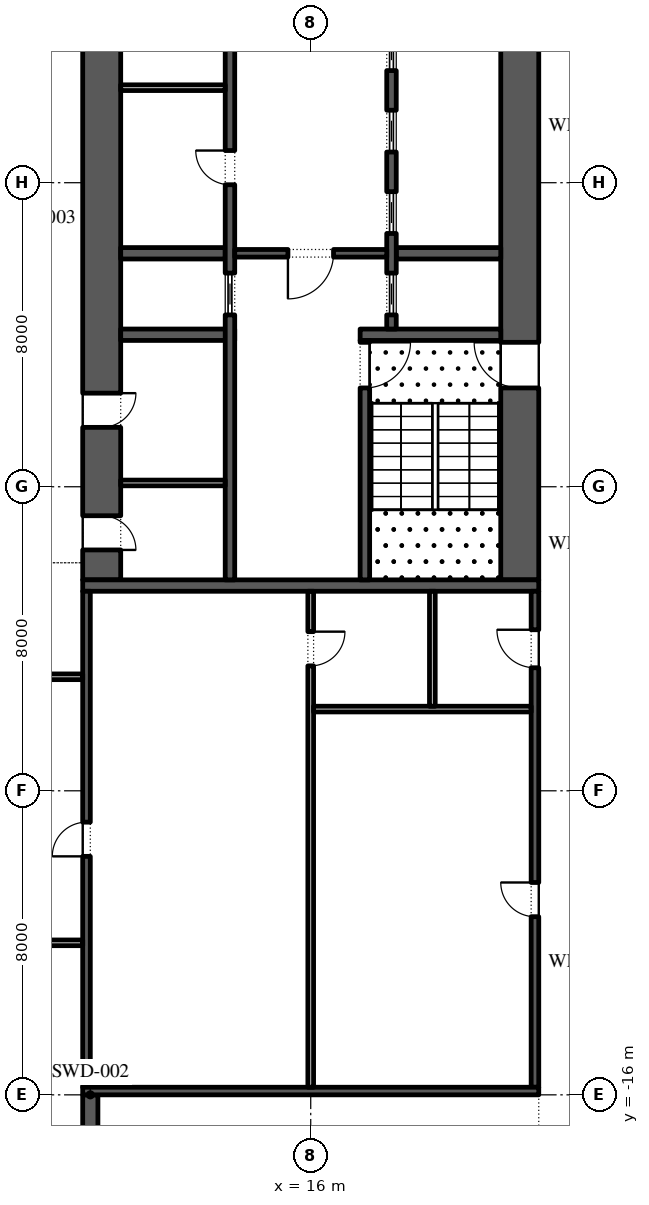
"""IFC4 building model, lengths in metres.
Left out: names, types, materials, properties, quantities, classifications, styles, units other than length and angle.
Written with IfcOpenShell. Run it as: python <this file> out.ifc"""

import sys

from ifc_helpers import new_model, si_unit, direction, frame, frame_2d, origin, place, context, subcontext, project, spatial, rectangle, extrude, element, fill, save


model = new_model("IFC4")
c1 = context("Model", 3, precision=1e-05, world=origin(), true_north=direction((0.0, 1.0)))
c2 = subcontext(c1, "Body", "Model", "MODEL_VIEW")
j1 = project(units=[si_unit("LENGTHUNIT", "METRE"), si_unit("PLANEANGLEUNIT", "RADIAN")], contexts=[c1])
p1 = place(None, origin())
s1 = spatial("IfcSite", under=j1, at=p1, CompositionType="ELEMENT")
p2 = place(p1, origin())
s2 = spatial("IfcBuilding", under=s1, at=p2, CompositionType="ELEMENT")
p3 = place(p2, frame((0.0, 0.0, 8.0)))
s3 = spatial("IfcBuildingStorey", under=s2, at=p3, CompositionType="ELEMENT", Elevation=8.0)
p4 = place(p3, frame((10.2, -31.0, 0.0), z_axis=(0.0, 0.0, 1.0), x_axis=(0.0, 1.0, 0.0)))
e1 = element("IfcWall", 1, at=p4, inside=s3, PredefinedType="SHEAR", context=c2, shape_type="SweptSolid", body=[
    extrude(rectangle(XDim=15.0, YDim=0.4, at=frame_2d((7.5, 0.0))), origin(), (0.0, 0.0, 1.0), 5.7),
])
p5 = place(p3, frame((21.5, -2.45, 0.0), z_axis=(0.0, 0.0, 1.0), x_axis=(0.0, 1.0, 0.0)))
e2 = element("IfcWall", 2, at=p5, inside=s3, PredefinedType="SHEAR", context=c2, shape_type="SweptSolid", body=[
    extrude(rectangle(XDim=27.9, YDim=1.0, at=frame_2d((13.95, 0.0))), origin(), (0.0, 0.0, 1.0), 5.7),
])
p6 = place(p5, frame((5.05, 0.0, 0.0)))
e3 = element("IfcOpeningElement", 3, at=p6, cuts=e2, PredefinedType="OPENING", context=c2, shape_type="SweptSolid", body=[
    extrude(rectangle(XDim=1.2, YDim=2.1, at=frame_2d((0.6, 1.05))), frame((0.0, 0.51, 0.0), z_axis=(0.0, -1.0, 0.0), x_axis=(1.0, 0.0, 0.0)), (0.0, 0.0, 1.0), 1.02),
])
p7 = place(p5, frame((21.65, 0.0, 0.0)))
e4 = element("IfcOpeningElement", 4, at=p7, cuts=e2, PredefinedType="OPENING", context=c2, shape_type="SweptSolid", body=[
    extrude(rectangle(XDim=1.2, YDim=2.1, at=frame_2d((0.6, 1.05))), frame((0.0, 0.51, 0.0), z_axis=(0.0, -1.0, 0.0), x_axis=(1.0, 0.0, 0.0)), (0.0, 0.0, 1.0), 1.02),
])
p8 = place(p3, frame((10.5, -2.45, 0.0), z_axis=(0.0, 0.0, 1.0), x_axis=(0.0, 1.0, 0.0)))
e5 = element("IfcWall", 5, at=p8, inside=s3, PredefinedType="SHEAR", context=c2, shape_type="SweptSolid", body=[
    extrude(rectangle(XDim=27.9, YDim=1.0, at=frame_2d((13.95, 0.0))), origin(), (0.0, 0.0, 1.0), 5.7),
])
p9 = place(p8, frame((23.65, 0.0, 0.0)))
e6 = element("IfcOpeningElement", 6, at=p9, cuts=e5, PredefinedType="OPENING", context=c2, shape_type="SweptSolid", body=[
    extrude(rectangle(XDim=2.4, YDim=2.1, at=frame_2d((1.2, 1.05))), frame((0.0, 0.51, 0.0), z_axis=(0.0, -1.0, 0.0), x_axis=(1.0, 0.0, 0.0)), (0.0, 0.0, 1.0), 1.02),
])
p10 = place(p8, frame((0.788, 0.0, 0.0)))
e7 = element("IfcOpeningElement", 7, at=p10, cuts=e5, PredefinedType="OPENING", context=c2, shape_type="SweptSolid", body=[
    extrude(rectangle(XDim=0.9, YDim=2.1, at=frame_2d((0.45, 1.05))), frame((0.0, 0.51, 0.0), z_axis=(0.0, -1.0, 0.0), x_axis=(1.0, 0.0, 0.0)), (0.0, 0.0, 1.0), 1.02),
])
p11 = place(p8, frame((4.012, 0.0, 0.0)))
e8 = element("IfcOpeningElement", 8, at=p11, cuts=e5, PredefinedType="OPENING", context=c2, shape_type="SweptSolid", body=[
    extrude(rectangle(XDim=0.9, YDim=2.1, at=frame_2d((0.45, 1.05))), frame((0.0, 0.51, 0.0), z_axis=(0.0, -1.0, 0.0), x_axis=(1.0, 0.0, 0.0)), (0.0, 0.0, 1.0), 1.02),
])
p12 = place(p3, frame((10.0, -2.6, 0.0), z_axis=(0.0, 0.0, 1.0), x_axis=(1.0, 0.0, 0.0)))
e9 = element("IfcWall", 9, at=p12, inside=s3, PredefinedType="SHEAR", context=c2, shape_type="SweptSolid", body=[
    extrude(rectangle(XDim=12.0, YDim=0.3, at=frame_2d((6.0, 0.0))), origin(), (0.0, 0.0, 1.0), 5.7),
])
p13 = place(p3, frame((17.3, 4.0, 0.0), z_axis=(0.0, 0.0, 1.0), x_axis=(1.0, 0.0, 0.0)))
e10 = element("IfcWall", 10, at=p13, inside=s3, PredefinedType="SHEAR", context=c2, shape_type="SweptSolid", body=[
    extrude(rectangle(XDim=3.7, YDim=0.3, at=frame_2d((1.85, 0.0))), origin(), (0.0, 0.0, 1.0), 5.7),
])
p14 = place(p3, frame((17.425, -2.45, 0.0), z_axis=(0.0, 0.0, 1.0), x_axis=(0.0, 1.0, 0.0)))
e11 = element("IfcWall", 11, at=p14, inside=s3, PredefinedType="SHEAR", context=c2, shape_type="SweptSolid", body=[
    extrude(rectangle(XDim=6.3, YDim=0.25, at=frame_2d((3.15, 0.0))), origin(), (0.0, 0.0, 1.0), 5.7),
])
p15 = place(p14, frame((5.05, 0.0, 0.0)))
e12 = element("IfcOpeningElement", 12, at=p15, cuts=e11, PredefinedType="OPENING", context=c2, shape_type="SweptSolid", body=[
    extrude(rectangle(XDim=1.2, YDim=2.1, at=frame_2d((0.6, 1.05))), frame((0.0, 0.135, 0.0), z_axis=(0.0, -1.0, 0.0), x_axis=(1.0, 0.0, 0.0)), (0.0, 0.0, 1.0), 0.27),
])
p16 = place(p3, frame((18.25, 6.143, 0.0), z_axis=(0.0, 0.0, 1.0), x_axis=(1.0, 0.0, 0.0)))
e13 = element("IfcWall", 13, at=p16, inside=s3, PredefinedType="SHEAR", context=c2, shape_type="SweptSolid", body=[
    extrude(rectangle(XDim=2.75, YDim=0.3, at=frame_2d((1.375, 0.0))), origin(), (0.0, 0.0, 1.0), 5.7),
])
p17 = place(p3, frame((18.125, 4.15, 0.0), z_axis=(0.0, 0.0, 1.0), x_axis=(0.0, 1.0, 0.0)))
e14 = element("IfcWall", 14, at=p17, inside=s3, PredefinedType="SHEAR", context=c2, shape_type="SweptSolid", body=[
    extrude(rectangle(XDim=14.7, YDim=0.25, at=frame_2d((7.35, 0.0))), origin(), (0.0, 0.0, 1.0), 5.7),
])
p18 = place(p17, frame((0.371, 0.0, 0.0)))
e15 = element("IfcOpeningElement", 15, at=p18, cuts=e14, PredefinedType="OPENING", context=c2, shape_type="SweptSolid", body=[
    extrude(rectangle(XDim=1.1, YDim=2.1, at=frame_2d((0.55, 1.05))), frame((0.0, 0.135, 0.0), z_axis=(0.0, -1.0, 0.0), x_axis=(1.0, 0.0, 0.0)), (0.0, 0.0, 1.0), 0.27),
])
p19 = place(p17, frame((2.514, 0.0, 0.0)))
e16 = element("IfcOpeningElement", 16, at=p19, cuts=e14, PredefinedType="OPENING", context=c2, shape_type="SweptSolid", body=[
    extrude(rectangle(XDim=1.1, YDim=2.1, at=frame_2d((0.55, 1.05))), frame((0.0, 0.135, 0.0), z_axis=(0.0, -1.0, 0.0), x_axis=(1.0, 0.0, 0.0)), (0.0, 0.0, 1.0), 0.27),
])
p20 = place(p17, frame((4.657, 0.0, 0.0)))
e17 = element("IfcOpeningElement", 17, at=p20, cuts=e14, PredefinedType="OPENING", context=c2, shape_type="SweptSolid", body=[
    extrude(rectangle(XDim=1.1, YDim=2.1, at=frame_2d((0.55, 1.05))), frame((0.0, 0.135, 0.0), z_axis=(0.0, -1.0, 0.0), x_axis=(1.0, 0.0, 0.0)), (0.0, 0.0, 1.0), 0.27),
])
p21 = place(p17, frame((6.8, 0.0, 0.0)))
e18 = element("IfcOpeningElement", 18, at=p21, cuts=e14, PredefinedType="OPENING", context=c2, shape_type="SweptSolid", body=[
    extrude(rectangle(XDim=1.1, YDim=2.1, at=frame_2d((0.55, 1.05))), frame((0.0, 0.135, 0.0), z_axis=(0.0, -1.0, 0.0), x_axis=(1.0, 0.0, 0.0)), (0.0, 0.0, 1.0), 0.27),
])
p22 = place(p17, frame((8.943, 0.0, 0.0)))
e19 = element("IfcOpeningElement", 19, at=p22, cuts=e14, PredefinedType="OPENING", context=c2, shape_type="SweptSolid", body=[
    extrude(rectangle(XDim=1.1, YDim=2.1, at=frame_2d((0.55, 1.05))), frame((0.0, 0.135, 0.0), z_axis=(0.0, -1.0, 0.0), x_axis=(1.0, 0.0, 0.0)), (0.0, 0.0, 1.0), 0.27),
])
p23 = place(p17, frame((11.086, 0.0, 0.0)))
e20 = element("IfcOpeningElement", 20, at=p23, cuts=e14, PredefinedType="OPENING", context=c2, shape_type="SweptSolid", body=[
    extrude(rectangle(XDim=1.1, YDim=2.1, at=frame_2d((0.55, 1.05))), frame((0.0, 0.135, 0.0), z_axis=(0.0, -1.0, 0.0), x_axis=(1.0, 0.0, 0.0)), (0.0, 0.0, 1.0), 0.27),
])
p24 = place(p17, frame((13.229, 0.0, 0.0)))
e21 = element("IfcOpeningElement", 21, at=p24, cuts=e14, PredefinedType="OPENING", context=c2, shape_type="SweptSolid", body=[
    extrude(rectangle(XDim=1.1, YDim=2.1, at=frame_2d((0.55, 1.05))), frame((0.0, 0.135, 0.0), z_axis=(0.0, -1.0, 0.0), x_axis=(1.0, 0.0, 0.0)), (0.0, 0.0, 1.0), 0.27),
])
p25 = place(p3, frame((11.0, 4.0, 0.0), z_axis=(0.0, 0.0, 1.0), x_axis=(1.0, 0.0, 0.0)))
e22 = element("IfcWall", 22, at=p25, inside=s3, PredefinedType="SHEAR", context=c2, shape_type="SweptSolid", body=[
    extrude(rectangle(XDim=3.0, YDim=0.3, at=frame_2d((1.5, 0.0))), origin(), (0.0, 0.0, 1.0), 5.7),
])
p26 = place(p3, frame((11.0, 6.143, 0.0), z_axis=(0.0, 0.0, 1.0), x_axis=(1.0, 0.0, 0.0)))
e23 = element("IfcWall", 23, at=p26, inside=s3, PredefinedType="SHEAR", context=c2, shape_type="SweptSolid", body=[
    extrude(rectangle(XDim=2.75, YDim=0.3, at=frame_2d((1.375, 0.0))), origin(), (0.0, 0.0, 1.0), 5.7),
])
p27 = place(p3, frame((13.875, -2.45, 0.0), z_axis=(0.0, 0.0, 1.0), x_axis=(0.0, 1.0, 0.0)))
e24 = element("IfcWall", 24, at=p27, inside=s3, PredefinedType="SHEAR", context=c2, shape_type="SweptSolid", body=[
    extrude(rectangle(XDim=21.3, YDim=0.25, at=frame_2d((10.65, 0.0))), origin(), (0.0, 0.0, 1.0), 5.7),
])
p28 = place(p27, frame((10.396, 0.0, 0.0)))
e25 = element("IfcOpeningElement", 25, at=p28, cuts=e24, PredefinedType="OPENING", context=c2, shape_type="SweptSolid", body=[
    extrude(rectangle(XDim=0.9, YDim=2.1, at=frame_2d((0.45, 1.05))), frame((0.0, 0.135, 0.0), z_axis=(0.0, -1.0, 0.0), x_axis=(1.0, 0.0, 0.0)), (0.0, 0.0, 1.0), 0.27),
])
p29 = place(p27, frame((14.6, 0.0, 0.0)))
e26 = element("IfcOpeningElement", 26, at=p29, cuts=e24, PredefinedType="OPENING", context=c2, shape_type="SweptSolid", body=[
    extrude(rectangle(XDim=0.9, YDim=2.1, at=frame_2d((0.45, 1.05))), frame((0.0, 0.135, 0.0), z_axis=(0.0, -1.0, 0.0), x_axis=(1.0, 0.0, 0.0)), (0.0, 0.0, 1.0), 0.27),
])
p30 = place(p27, frame((18.775, 0.0, 0.0)))
e27 = element("IfcOpeningElement", 27, at=p30, cuts=e24, PredefinedType="OPENING", context=c2, shape_type="SweptSolid", body=[
    extrude(rectangle(XDim=0.9, YDim=2.1, at=frame_2d((0.45, 1.05))), frame((0.0, 0.135, 0.0), z_axis=(0.0, -1.0, 0.0), x_axis=(1.0, 0.0, 0.0)), (0.0, 0.0, 1.0), 0.27),
])
p31 = place(p27, frame((6.971, 0.0, 0.0)))
e28 = element("IfcOpeningElement", 28, at=p31, cuts=e24, PredefinedType="OPENING", context=c2, shape_type="SweptSolid", body=[
    extrude(rectangle(XDim=1.1, YDim=2.1, at=frame_2d((0.55, 1.05))), frame((0.0, 0.135, 0.0), z_axis=(0.0, -1.0, 0.0), x_axis=(1.0, 0.0, 0.0)), (0.0, 0.0, 1.0), 0.27),
])
p32 = place(p3, frame((11.0, 10.5, 0.0), z_axis=(0.0, 0.0, 1.0), x_axis=(1.0, 0.0, 0.0)))
e29 = element("IfcWall", 29, at=p32, inside=s3, PredefinedType="PARTITIONING", context=c2, shape_type="SweptSolid", body=[
    extrude(rectangle(XDim=2.75, YDim=0.15, at=frame_2d((1.375, 0.0))), origin(), (0.0, 0.0, 1.0), 5.7),
])
p33 = place(p3, frame((14.0, 6.143, 0.0), z_axis=(0.0, 0.0, 1.0), x_axis=(1.0, 0.0, 0.0)))
e30 = element("IfcWall", 30, at=p33, inside=s3, PredefinedType="SHEAR", context=c2, shape_type="SweptSolid", body=[
    extrude(rectangle(XDim=4.0, YDim=0.2, at=frame_2d((2.0, 0.0))), origin(), (0.0, 0.0, 1.0), 5.7),
])
p34 = place(p33, frame((1.4, 0.0, 0.0)))
e31 = element("IfcOpeningElement", 31, at=p34, cuts=e30, PredefinedType="OPENING", context=c2, shape_type="SweptSolid", body=[
    extrude(rectangle(XDim=1.2, YDim=2.1, at=frame_2d((0.6, 1.05))), frame((0.0, 0.11, 0.0), z_axis=(0.0, -1.0, 0.0), x_axis=(1.0, 0.0, 0.0)), (0.0, 0.0, 1.0), 0.22),
])
p35 = place(p3, frame((11.0, 0.1, 0.0), z_axis=(0.0, 0.0, 1.0), x_axis=(1.0, 0.0, 0.0)))
e32 = element("IfcWall", 32, at=p35, inside=s3, PredefinedType="PARTITIONING", context=c2, shape_type="SweptSolid", body=[
    extrude(rectangle(XDim=2.75, YDim=0.15, at=frame_2d((1.375, 0.0))), origin(), (0.0, 0.0, 1.0), 5.7),
])
p36 = place(p3, frame((21.9, -15.8, 0.0), z_axis=(0.0, 0.0, 1.0), x_axis=(0.0, 1.0, 0.0)))
e33 = element("IfcWall", 33, at=p36, inside=s3, PredefinedType="SHEAR", context=c2, shape_type="SweptSolid", body=[
    extrude(rectangle(XDim=13.05, YDim=0.2, at=frame_2d((6.525, 0.0))), origin(), (0.0, 0.0, 1.0), 5.7),
])
p37 = place(p36, frame((4.488, 0.0, 0.0)))
e34 = element("IfcOpeningElement", 34, at=p37, cuts=e33, PredefinedType="OPENING", context=c2, shape_type="SweptSolid", body=[
    extrude(rectangle(XDim=0.9, YDim=2.1, at=frame_2d((0.45, 1.05))), frame((0.0, 0.11, 0.0), z_axis=(0.0, -1.0, 0.0), x_axis=(1.0, 0.0, 0.0)), (0.0, 0.0, 1.0), 0.22),
])
p38 = place(p36, frame((11.038, 0.0, 0.0)))
e35 = element("IfcOpeningElement", 35, at=p38, cuts=e33, PredefinedType="OPENING", context=c2, shape_type="SweptSolid", body=[
    extrude(rectangle(XDim=1.0, YDim=2.1, at=frame_2d((0.5, 1.05))), frame((0.0, 0.11, 0.0), z_axis=(0.0, -1.0, 0.0), x_axis=(1.0, 0.0, 0.0)), (0.0, 0.0, 1.0), 0.22),
])
p39 = place(p3, frame((10.1, -15.8, 0.0), z_axis=(0.0, 0.0, 1.0), x_axis=(0.0, 1.0, 0.0)))
e36 = element("IfcWall", 36, at=p39, inside=s3, PredefinedType="SHEAR", context=c2, shape_type="SweptSolid", body=[
    extrude(rectangle(XDim=13.05, YDim=0.2, at=frame_2d((6.525, 0.0))), origin(), (0.0, 0.0, 1.0), 5.7),
])
p40 = place(p39, frame((6.075, 0.0, 0.0)))
e37 = element("IfcOpeningElement", 37, at=p40, cuts=e36, PredefinedType="OPENING", context=c2, shape_type="SweptSolid", body=[
    extrude(rectangle(XDim=0.9, YDim=2.1, at=frame_2d((0.45, 1.05))), frame((0.0, 0.11, 0.0), z_axis=(0.0, -1.0, 0.0), x_axis=(1.0, 0.0, 0.0)), (0.0, 0.0, 1.0), 0.22),
])
p41 = place(p3, frame((10.0, -15.9, 0.0), z_axis=(0.0, 0.0, 1.0), x_axis=(1.0, 0.0, 0.0)))
e38 = element("IfcWall", 38, at=p41, inside=s3, PredefinedType="SHEAR", context=c2, shape_type="SweptSolid", body=[
    extrude(rectangle(XDim=12.0, YDim=0.2, at=frame_2d((6.0, 0.0))), origin(), (0.0, 0.0, 1.0), 5.7),
])
p42 = place(p3, frame((16.0, -15.8, 0.0), z_axis=(0.0, 0.0, 1.0), x_axis=(0.0, 1.0, 0.0)))
e39 = element("IfcWall", 39, at=p42, inside=s3, PredefinedType="PARTITIONING", context=c2, shape_type="SweptSolid", body=[
    extrude(rectangle(XDim=13.05, YDim=0.15, at=frame_2d((6.525, 0.0))), origin(), (0.0, 0.0, 1.0), 5.7),
])
p43 = place(p42, frame((11.087, 0.0, 0.0)))
e40 = element("IfcOpeningElement", 40, at=p43, cuts=e39, PredefinedType="OPENING", context=c2, shape_type="SweptSolid", body=[
    extrude(rectangle(XDim=0.9, YDim=2.1, at=frame_2d((0.45, 1.05))), frame((0.0, 0.085, 0.0), z_axis=(0.0, -1.0, 0.0), x_axis=(1.0, 0.0, 0.0)), (0.0, 0.0, 1.0), 0.17),
])
p44 = place(p3, frame((16.075, -5.85, 0.0), z_axis=(0.0, 0.0, 1.0), x_axis=(1.0, 0.0, 0.0)))
e41 = element("IfcWall", 41, at=p44, inside=s3, PredefinedType="PARTITIONING", context=c2, shape_type="SweptSolid", body=[
    extrude(rectangle(XDim=5.725, YDim=0.15, at=frame_2d((2.863, 0.0))), origin(), (0.0, 0.0, 1.0), 5.7),
])
p45 = place(p3, frame((19.2, -5.775, 0.0), z_axis=(0.0, 0.0, 1.0), x_axis=(0.0, 1.0, 0.0)))
e42 = element("IfcWall", 42, at=p45, inside=s3, PredefinedType="PARTITIONING", context=c2, shape_type="SweptSolid", body=[
    extrude(rectangle(XDim=3.025, YDim=0.15, at=frame_2d((1.512, 0.0))), origin(), (0.0, 0.0, 1.0), 5.7),
])
p46 = place(p3, frame((2.075, -12.0, 0.0), z_axis=(0.0, 0.0, 1.0), x_axis=(1.0, 0.0, 0.0)))
e43 = element("IfcWall", 43, at=p46, inside=s3, PredefinedType="PARTITIONING", context=c2, shape_type="SweptSolid", body=[
    extrude(rectangle(XDim=7.925, YDim=0.15, at=frame_2d((3.962, 0.0))), origin(), (0.0, 0.0, 1.0), 5.7),
])
p47 = place(p3, frame((2.075, -5.0, 0.0), z_axis=(0.0, 0.0, 1.0), x_axis=(1.0, 0.0, 0.0)))
e44 = element("IfcWall", 44, at=p47, inside=s3, PredefinedType="PARTITIONING", context=c2, shape_type="SweptSolid", body=[
    extrude(rectangle(XDim=7.925, YDim=0.15, at=frame_2d((3.962, 0.0))), origin(), (0.0, 0.0, 1.0), 5.7),
])
p48 = place(p47, frame((3.462, 0.0, 0.0)))
e45 = element("IfcOpeningElement", 45, at=p48, cuts=e44, PredefinedType="OPENING", context=c2, shape_type="SweptSolid", body=[
    extrude(rectangle(XDim=1.0, YDim=2.1, at=frame_2d((0.5, 1.05))), frame((0.0, 0.085, 0.0), z_axis=(0.0, -1.0, 0.0), x_axis=(1.0, 0.0, 0.0)), (0.0, 0.0, 1.0), 0.17),
])
p49 = place(p18, origin())
e46 = element("IfcDoor", 46, at=p49, inside=s3, OperationType="SLIDING_TO_LEFT", PredefinedType="DOOR", context=c2, shape_type="SweptSolid", body=[
    extrude(rectangle(XDim=1.1, YDim=2.1, at=frame_2d((0.55, 1.05))), frame((0.0, 0.025, 0.0), z_axis=(0.0, -1.0, 0.0), x_axis=(1.0, 0.0, 0.0)), (0.0, 0.0, 1.0), 0.05),
])
fill(e15, e46)
p50 = place(p19, origin())
e47 = element("IfcDoor", 47, at=p50, inside=s3, OperationType="SLIDING_TO_LEFT", PredefinedType="DOOR", context=c2, shape_type="SweptSolid", body=[
    extrude(rectangle(XDim=1.1, YDim=2.1, at=frame_2d((0.55, 1.05))), frame((0.0, 0.025, 0.0), z_axis=(0.0, -1.0, 0.0), x_axis=(1.0, 0.0, 0.0)), (0.0, 0.0, 1.0), 0.05),
])
fill(e16, e47)
p51 = place(p20, origin())
e48 = element("IfcDoor", 48, at=p51, inside=s3, OperationType="SLIDING_TO_LEFT", PredefinedType="DOOR", context=c2, shape_type="SweptSolid", body=[
    extrude(rectangle(XDim=1.1, YDim=2.1, at=frame_2d((0.55, 1.05))), frame((0.0, 0.025, 0.0), z_axis=(0.0, -1.0, 0.0), x_axis=(1.0, 0.0, 0.0)), (0.0, 0.0, 1.0), 0.05),
])
fill(e17, e48)
p52 = place(p21, origin())
e49 = element("IfcDoor", 49, at=p52, inside=s3, OperationType="SLIDING_TO_LEFT", PredefinedType="DOOR", context=c2, shape_type="SweptSolid", body=[
    extrude(rectangle(XDim=1.1, YDim=2.1, at=frame_2d((0.55, 1.05))), frame((0.0, 0.025, 0.0), z_axis=(0.0, -1.0, 0.0), x_axis=(1.0, 0.0, 0.0)), (0.0, 0.0, 1.0), 0.05),
])
fill(e18, e49)
p53 = place(p28, origin())
e50 = element("IfcDoor", 50, at=p53, inside=s3, OperationType="SINGLE_SWING_LEFT", PredefinedType="DOOR", context=c2, shape_type="SweptSolid", body=[
    extrude(rectangle(XDim=0.9, YDim=2.1, at=frame_2d((0.45, 1.05))), frame((0.0, 0.125, 0.0), z_axis=(0.0, -1.0, 0.0), x_axis=(1.0, 0.0, 0.0)), (0.0, 0.0, 1.0), 0.05),
])
fill(e25, e50)
p54 = place(p31, origin())
e51 = element("IfcDoor", 51, at=p54, inside=s3, OperationType="SLIDING_TO_LEFT", PredefinedType="DOOR", context=c2, shape_type="SweptSolid", body=[
    extrude(rectangle(XDim=1.1, YDim=2.1, at=frame_2d((0.55, 1.05))), frame((0.0, 0.025, 0.0), z_axis=(0.0, -1.0, 0.0), x_axis=(1.0, 0.0, 0.0)), (0.0, 0.0, 1.0), 0.05),
])
fill(e28, e51)
p55 = place(p34, frame((1.2, 0.0, 0.0), z_axis=(0.0, 0.0, 1.0), x_axis=(-1.0, 0.0, 0.0)))
e52 = element("IfcDoor", 52, at=p55, inside=s3, OperationType="SINGLE_SWING_LEFT", PredefinedType="DOOR", context=c2, shape_type="SweptSolid", body=[
    extrude(rectangle(XDim=1.2, YDim=2.1, at=frame_2d((0.6, 1.05))), frame((0.0, 0.025, 0.0), z_axis=(0.0, -1.0, 0.0), x_axis=(1.0, 0.0, 0.0)), (0.0, 0.0, 1.0), 0.05),
])
fill(e31, e52)
p56 = place(p15, frame((1.2, 0.0, 0.0), z_axis=(0.0, 0.0, 1.0), x_axis=(-1.0, 0.0, 0.0)))
e53 = element("IfcDoor", 53, at=p56, inside=s3, OperationType="SINGLE_SWING_RIGHT", PredefinedType="DOOR", context=c2, shape_type="SweptSolid", body=[
    extrude(rectangle(XDim=1.2, YDim=2.1, at=frame_2d((0.6, 1.05))), frame((0.0, 0.025, 0.0), z_axis=(0.0, -1.0, 0.0), x_axis=(1.0, 0.0, 0.0)), (0.0, 0.0, 1.0), 0.05),
])
fill(e12, e53)
p57 = place(p6, origin())
e54 = element("IfcDoor", 54, at=p57, inside=s3, OperationType="SINGLE_SWING_LEFT", PredefinedType="DOOR", context=c2, shape_type="SweptSolid", body=[
    extrude(rectangle(XDim=1.2, YDim=2.1, at=frame_2d((0.6, 1.05))), frame((0.0, 0.025, 0.0), z_axis=(0.0, -1.0, 0.0), x_axis=(1.0, 0.0, 0.0)), (0.0, 0.0, 1.0), 0.05),
])
fill(e3, e54)
p58 = place(p10, frame((0.9, -0.95, 0.0), z_axis=(0.0, 0.0, 1.0), x_axis=(-1.0, 0.0, 0.0)))
e55 = element("IfcDoor", 55, at=p58, inside=s3, OperationType="SINGLE_SWING_LEFT", PredefinedType="DOOR", context=c2, shape_type="SweptSolid", body=[
    extrude(rectangle(XDim=0.9, YDim=2.1, at=frame_2d((0.45, 1.05))), frame((0.0, -0.45, 0.0), z_axis=(0.0, -1.0, 0.0), x_axis=(1.0, 0.0, 0.0)), (0.0, 0.0, 1.0), 0.05),
])
fill(e7, e55)
p59 = place(p11, frame((0.9, -0.95, 0.0), z_axis=(0.0, 0.0, 1.0), x_axis=(-1.0, 0.0, 0.0)))
e56 = element("IfcDoor", 56, at=p59, inside=s3, OperationType="SINGLE_SWING_RIGHT", PredefinedType="DOOR", context=c2, shape_type="SweptSolid", body=[
    extrude(rectangle(XDim=0.9, YDim=2.1, at=frame_2d((0.45, 1.05))), frame((0.0, -0.45, 0.0), z_axis=(0.0, -1.0, 0.0), x_axis=(1.0, 0.0, 0.0)), (0.0, 0.0, 1.0), 0.05),
])
fill(e8, e56)
p60 = place(p37, origin())
e57 = element("IfcDoor", 57, at=p60, inside=s3, OperationType="SINGLE_SWING_LEFT", PredefinedType="DOOR", context=c2, shape_type="SweptSolid", body=[
    extrude(rectangle(XDim=0.9, YDim=2.1, at=frame_2d((0.45, 1.05))), frame((0.0, 0.1, 0.0), z_axis=(0.0, -1.0, 0.0), x_axis=(1.0, 0.0, 0.0)), (0.0, 0.0, 1.0), 0.05),
])
fill(e34, e57)
p61 = place(p38, origin())
e58 = element("IfcDoor", 58, at=p61, inside=s3, OperationType="SINGLE_SWING_LEFT", PredefinedType="DOOR", context=c2, shape_type="SweptSolid", body=[
    extrude(rectangle(XDim=1.0, YDim=2.1, at=frame_2d((0.5, 1.05))), frame((0.0, 0.1, 0.0), z_axis=(0.0, -1.0, 0.0), x_axis=(1.0, 0.0, 0.0)), (0.0, 0.0, 1.0), 0.05),
])
fill(e35, e58)
p62 = place(p43, frame((0.9, 0.0, 0.0), z_axis=(0.0, 0.0, 1.0), x_axis=(-1.0, 0.0, 0.0)))
e59 = element("IfcDoor", 59, at=p62, inside=s3, OperationType="SINGLE_SWING_RIGHT", PredefinedType="DOOR", context=c2, shape_type="SweptSolid", body=[
    extrude(rectangle(XDim=0.9, YDim=2.1, at=frame_2d((0.45, 1.05))), frame((0.0, 0.025, 0.0), z_axis=(0.0, -1.0, 0.0), x_axis=(1.0, 0.0, 0.0)), (0.0, 0.0, 1.0), 0.05),
])
fill(e40, e59)
p63 = place(p40, origin())
e60 = element("IfcDoor", 60, at=p63, inside=s3, OperationType="SINGLE_SWING_RIGHT", PredefinedType="DOOR", context=c2, shape_type="SweptSolid", body=[
    extrude(rectangle(XDim=0.9, YDim=2.1, at=frame_2d((0.45, 1.05))), frame((0.0, -0.05, 0.0), z_axis=(0.0, -1.0, 0.0), x_axis=(1.0, 0.0, 0.0)), (0.0, 0.0, 1.0), 0.05),
])
fill(e37, e60)
save(model, sys.argv[1])
